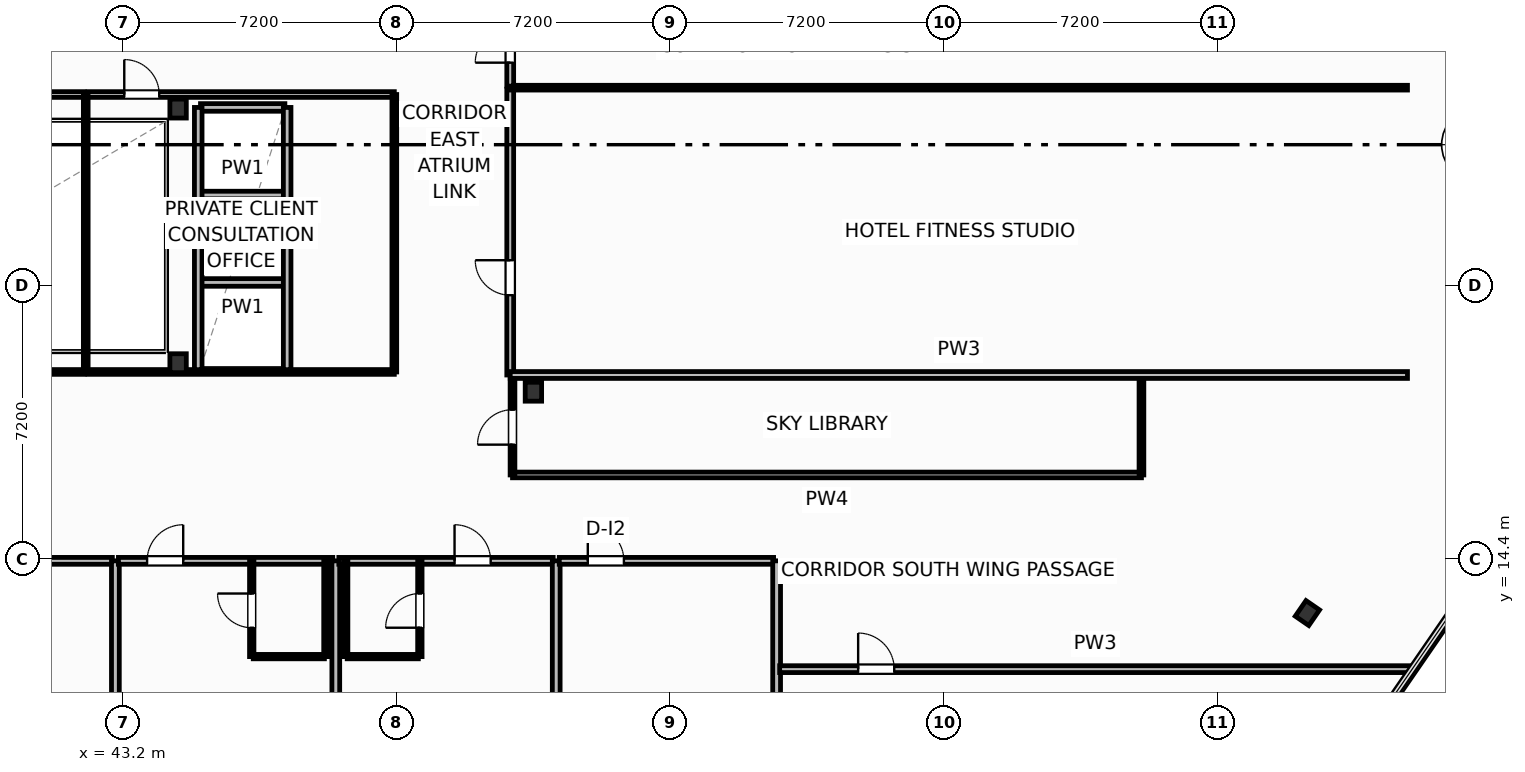
"""IFC4 building model, lengths in metres.
Left out: names, types, materials, properties, quantities, classifications, styles, units other than length and angle.
Written with IfcOpenShell. Run it as: python <this file> out.ifc"""

import sys

from ifc_helpers import new_model, si_unit, direction, frame, frame_2d, origin, origin_2d, place, context, subcontext, project, spatial, rectangle, i_section, extrude, element, fill, save


model = new_model("IFC4")
c1 = context("Model", 3, precision=1e-05, world=origin(), true_north=direction((0.0, 1.0)))
c2 = subcontext(c1, "Body", "Model", "MODEL_VIEW")
j1 = project(units=[si_unit("LENGTHUNIT", "METRE"), si_unit("PLANEANGLEUNIT", "RADIAN")], contexts=[c1])
p1 = place(None, origin())
s1 = spatial("IfcSite", under=j1, at=p1, CompositionType="ELEMENT")
p2 = place(p1, origin())
s2 = spatial("IfcBuilding", under=s1, at=p2, CompositionType="ELEMENT")
p3 = place(p2, frame((0.0, 0.0, 67.7)))
s3 = spatial("IfcBuildingStorey", under=s2, at=p3, CompositionType="ELEMENT", Elevation=67.7)
for number, where, z_axis, x_axis in (
    (1, (44.65, 19.55, 0.0), (0.0, 0.0, 1.0), (1.0, 0.0, 0.0)),
    (2, (44.65, 26.25, 0.0), (0.0, 0.0, 1.0), (1.0, 0.0, 0.0)),
    (3, (54.0, 18.8, 0.0), (0.0, 0.0, 1.0), (1.0, 0.0, 0.0)),
    (4, (74.367, 12.976, 0.0), (0.0, 0.0, 1.0), (0.824, -0.567, 0.0)),
):
    element("IfcColumn", number, at=place(p3, frame(where, z_axis=z_axis, x_axis=x_axis)), inside=s3, PredefinedType="COLUMN", context=c2, shape_type="SweptSolid", body=[
        extrude(i_section(OverallWidth=0.432, OverallDepth=0.498, WebThickness=0.056, FlangeThickness=0.089, FilletRadius=0.025, at=origin_2d()), origin(), (0.0, 0.0, 1.0), 3.7),
    ])
p4 = place(p3, frame((81.127, 26.995, 0.0), z_axis=(0.0, 0.0, 1.0), x_axis=(-0.823530169317, 0.567272474411, 0.0)))
e5 = element("IfcWall", 5, at=p4, inside=s3, PredefinedType="SOLIDWALL", context=c2, shape_type="SweptSolid", body=[
    extrude(rectangle(XDim=23.247, YDim=0.22, at=frame_2d((11.624, 0.0))), origin(), (0.0, 0.0, 1.0), 2.66),
])
p5 = place(p4, frame((10.799, 0.0, 0.8)))
e6 = element("IfcOpeningElement", 6, at=p5, cuts=e5, PredefinedType="OPENING", context=c2, shape_type="SweptSolid", body=[
    extrude(rectangle(XDim=1.65, YDim=1.65, at=frame_2d((0.825, 0.825))), frame((0.0, 0.12, 0.0), z_axis=(0.0, -1.0, 0.0), x_axis=(1.0, 0.0, 0.0)), (0.0, 0.0, 1.0), 0.24),
])
p6 = place(p3, frame((33.68, 26.62, 0.0), z_axis=(0.0, 0.0, 1.0), x_axis=(1.0, 0.0, 0.0)))
e7 = element("IfcWall", 7, at=p6, inside=s3, PredefinedType="PARTITIONING", context=c2, shape_type="SweptSolid", body=[
    extrude(rectangle(XDim=8.5, YDim=0.15, at=frame_2d((4.25, 0.0))), origin(), (0.0, 0.0, 1.0), 3.38),
])
p7 = place(p6, frame((1.85, 0.0, 0.0)))
e8 = element("IfcOpeningElement", 8, at=p7, cuts=e7, PredefinedType="OPENING", context=c2, shape_type="SweptSolid", body=[
    extrude(rectangle(XDim=0.92, YDim=2.05, at=frame_2d((0.46, 1.025))), frame((0.0, 0.085, 0.0), z_axis=(0.0, -1.0, 0.0), x_axis=(1.0, 0.0, 0.0)), (0.0, 0.0, 1.0), 0.17),
])
p8 = place(p3, frame((33.68, 19.32, 0.0), z_axis=(0.0, 0.0, 1.0), x_axis=(1.0, 0.0, 0.0)))
e9 = element("IfcWall", 9, at=p8, inside=s3, PredefinedType="PARTITIONING", context=c2, shape_type="SweptSolid", body=[
    extrude(rectangle(XDim=8.5, YDim=0.125, at=frame_2d((4.25, 0.0))), origin(), (0.0, 0.0, 1.0), 2.754),
])
p9 = place(p3, frame((42.22, 19.32, 0.0), z_axis=(0.0, 0.0, 1.0), x_axis=(0.0, 1.0, 0.0)))
e10 = element("IfcWall", 10, at=p9, inside=s3, PredefinedType="PARTITIONING", context=c2, shape_type="SweptSolid", body=[
    extrude(rectangle(XDim=7.3, YDim=0.125, at=frame_2d((3.65, 0.0))), origin(), (0.0, 0.0, 1.0), 3.38),
])
p10 = place(p3, frame((42.28, 26.62, 0.0), z_axis=(0.0, 0.0, 1.0), x_axis=(1.0, 0.0, 0.0)))
e11 = element("IfcWall", 11, at=p10, inside=s3, PredefinedType="PARTITIONING", context=c2, shape_type="SweptSolid", body=[
    extrude(rectangle(XDim=8.06, YDim=0.15, at=frame_2d((4.03, 0.0))), origin(), (0.0, 0.0, 1.0), 3.38),
])
p11 = place(p10, frame((0.954, 0.0, 0.0)))
e12 = element("IfcOpeningElement", 12, at=p11, cuts=e11, PredefinedType="OPENING", context=c2, shape_type="SweptSolid", body=[
    extrude(rectangle(XDim=0.92, YDim=2.05, at=frame_2d((0.46, 1.025))), frame((0.0, 0.085, 0.0), z_axis=(0.0, -1.0, 0.0), x_axis=(1.0, 0.0, 0.0)), (0.0, 0.0, 1.0), 0.17),
])
p12 = place(p3, frame((42.28, 19.32, 0.0), z_axis=(0.0, 0.0, 1.0), x_axis=(1.0, 0.0, 0.0)))
e13 = element("IfcWall", 13, at=p12, inside=s3, PredefinedType="PARTITIONING", context=c2, shape_type="SweptSolid", body=[
    extrude(rectangle(XDim=8.06, YDim=0.125, at=frame_2d((4.03, 0.0))), origin(), (0.0, 0.0, 1.0), 2.592),
])
p13 = place(p3, frame((50.34, 19.32, 0.0), z_axis=(0.0, 0.0, 1.0), x_axis=(0.0, 1.0, 0.0)))
e14 = element("IfcWall", 14, at=p13, inside=s3, PredefinedType="PARTITIONING", context=c2, shape_type="SweptSolid", body=[
    extrude(rectangle(XDim=7.3, YDim=0.125, at=frame_2d((3.65, 0.0))), origin(), (0.0, 0.0, 1.0), 3.38),
])
p14 = place(p3, frame((53.45, 16.61, 0.0), z_axis=(0.0, 0.0, 1.0), x_axis=(1.0, 0.0, 0.0)))
e15 = element("IfcWall", 15, at=p14, inside=s3, PredefinedType="PARTITIONING", context=c2, shape_type="SweptSolid", body=[
    extrude(rectangle(XDim=16.55, YDim=0.15, at=frame_2d((8.275, 0.0))), origin(), (0.0, 0.0, 1.0), 1.165),
])
p15 = place(p3, frame((53.45, 16.61, 0.0), z_axis=(0.0, 0.0, 1.0), x_axis=(0.0, 1.0, 0.0)))
e16 = element("IfcWall", 16, at=p15, inside=s3, PredefinedType="PARTITIONING", context=c2, shape_type="SweptSolid", body=[
    extrude(rectangle(XDim=2.63, YDim=0.125, at=frame_2d((1.315, 0.0))), origin(), (0.0, 0.0, 1.0), 3.38),
])
p16 = place(p15, frame((0.797, 0.0, 0.0)))
e17 = element("IfcOpeningElement", 17, at=p16, cuts=e16, PredefinedType="OPENING", context=c2, shape_type="SweptSolid", body=[
    extrude(rectangle(XDim=0.92, YDim=2.05, at=frame_2d((0.46, 1.025))), frame((0.0, 0.073, 0.0), z_axis=(0.0, -1.0, 0.0), x_axis=(1.0, 0.0, 0.0)), (0.0, 0.0, 1.0), 0.145),
])
p17 = place(p3, frame((70.0, 16.61, 0.0), z_axis=(0.0, 0.0, 1.0), x_axis=(0.0, 1.0, 0.0)))
e18 = element("IfcWall", 18, at=p17, inside=s3, PredefinedType="PARTITIONING", context=c2, shape_type="SweptSolid", body=[
    extrude(rectangle(XDim=2.63, YDim=0.125, at=frame_2d((1.315, 0.0))), origin(), (0.0, 0.0, 1.0), 0.65),
])
p18 = place(p3, frame((37.28, 14.35, 0.0), z_axis=(0.0, 0.0, 1.0), x_axis=(1.0, 0.0, 0.0)))
e19 = element("IfcWall", 19, at=p18, inside=s3, PredefinedType="PARTITIONING", context=c2, shape_type="SweptSolid", body=[
    extrude(rectangle(XDim=5.64, YDim=0.18, at=frame_2d((2.82, 0.0))), origin(), (0.0, 0.0, 1.0), 3.38),
])
p19 = place(p18, frame((3.045, 0.0, 0.0)))
e20 = element("IfcOpeningElement", 20, at=p19, cuts=e19, PredefinedType="OPENING", context=c2, shape_type="SweptSolid", body=[
    extrude(rectangle(XDim=0.95, YDim=2.15, at=frame_2d((0.475, 1.075))), frame((0.0, 0.1, 0.0), z_axis=(0.0, -1.0, 0.0), x_axis=(1.0, 0.0, 0.0)), (0.0, 0.0, 1.0), 0.2),
])
p20 = place(p3, frame((43.0, -4.0, 0.0), z_axis=(0.0, 0.0, 1.0), x_axis=(0.0, 1.0, 0.0)))
e21 = element("IfcWall", 21, at=p20, inside=s3, PredefinedType="PARTITIONING", context=c2, shape_type="SweptSolid", body=[
    extrude(rectangle(XDim=18.35, YDim=0.205, at=frame_2d((9.175, 0.0))), origin(), (0.0, 0.0, 1.0), 1.165),
])
p21 = place(p3, frame((43.08, 14.35, 0.0), z_axis=(0.0, 0.0, 1.0), x_axis=(1.0, 0.0, 0.0)))
e22 = element("IfcWall", 22, at=p21, inside=s3, PredefinedType="PARTITIONING", context=c2, shape_type="SweptSolid", body=[
    extrude(rectangle(XDim=5.64, YDim=0.18, at=frame_2d((2.82, 0.0))), origin(), (0.0, 0.0, 1.0), 3.38),
])
p22 = place(p21, frame((0.754, 0.0, 0.0)))
e23 = element("IfcOpeningElement", 23, at=p22, cuts=e22, PredefinedType="OPENING", context=c2, shape_type="SweptSolid", body=[
    extrude(rectangle(XDim=0.95, YDim=2.15, at=frame_2d((0.475, 1.075))), frame((0.0, 0.1, 0.0), z_axis=(0.0, -1.0, 0.0), x_axis=(1.0, 0.0, 0.0)), (0.0, 0.0, 1.0), 0.2),
])
p23 = place(p3, frame((46.628, 11.83, 0.0), z_axis=(0.0, 0.0, 1.0), x_axis=(1.0, 0.0, 0.0)))
e24 = element("IfcWall", 24, at=p23, inside=s3, PredefinedType="PARTITIONING", context=c2, shape_type="SweptSolid", body=[
    extrude(rectangle(XDim=1.872, YDim=0.115, at=frame_2d((0.936, 0.0))), origin(), (0.0, 0.0, 1.0), 3.38),
])
p24 = place(p3, frame((46.588, 11.83, 0.0), z_axis=(0.0, 0.0, 1.0), x_axis=(0.0, 1.0, 0.0)))
e25 = element("IfcWall", 25, at=p24, inside=s3, PredefinedType="PARTITIONING", context=c2, shape_type="SweptSolid", body=[
    extrude(rectangle(XDim=2.52, YDim=0.115, at=frame_2d((1.26, 0.0))), origin(), (0.0, 0.0, 1.0), 3.38),
])
p25 = place(p24, frame((0.76, 0.0, 0.0)))
e26 = element("IfcOpeningElement", 26, at=p25, cuts=e25, PredefinedType="OPENING", context=c2, shape_type="SweptSolid", body=[
    extrude(rectangle(XDim=0.9, YDim=2.05, at=frame_2d((0.45, 1.025))), frame((0.0, 0.067, 0.0), z_axis=(0.0, -1.0, 0.0), x_axis=(1.0, 0.0, 0.0)), (0.0, 0.0, 1.0), 0.135),
])
p26 = place(p3, frame((48.54, 11.83, 0.0), z_axis=(0.0, 0.0, 1.0), x_axis=(0.0, 1.0, 0.0)))
e27 = element("IfcWall", 27, at=p26, inside=s3, PredefinedType="PARTITIONING", context=c2, shape_type="SweptSolid", body=[
    extrude(rectangle(XDim=2.52, YDim=0.115, at=frame_2d((1.26, 0.0))), origin(), (0.0, 0.0, 1.0), 3.38),
])
p27 = place(p3, frame((48.8, -4.0, 0.0), z_axis=(0.0, 0.0, 1.0), x_axis=(0.0, 1.0, 0.0)))
e28 = element("IfcWall", 28, at=p27, inside=s3, PredefinedType="PARTITIONING", context=c2, shape_type="SweptSolid", body=[
    extrude(rectangle(XDim=18.35, YDim=0.205, at=frame_2d((9.175, 0.0))), origin(), (0.0, 0.0, 1.0), 3.38),
])
p28 = place(p3, frame((48.88, 14.35, 0.0), z_axis=(0.0, 0.0, 1.0), x_axis=(1.0, 0.0, 0.0)))
e29 = element("IfcWall", 29, at=p28, inside=s3, PredefinedType="PARTITIONING", context=c2, shape_type="SweptSolid", body=[
    extrude(rectangle(XDim=5.64, YDim=0.18, at=frame_2d((2.82, 0.0))), origin(), (0.0, 0.0, 1.0), 3.38),
])
p29 = place(p28, frame((3.045, 0.0, 0.0)))
e30 = element("IfcOpeningElement", 30, at=p29, cuts=e29, PredefinedType="OPENING", context=c2, shape_type="SweptSolid", body=[
    extrude(rectangle(XDim=0.95, YDim=2.15, at=frame_2d((0.475, 1.075))), frame((0.0, 0.1, 0.0), z_axis=(0.0, -1.0, 0.0), x_axis=(1.0, 0.0, 0.0)), (0.0, 0.0, 1.0), 0.2),
])
p30 = place(p3, frame((49.1, 11.83, 0.0), z_axis=(0.0, 0.0, 1.0), x_axis=(1.0, 0.0, 0.0)))
e31 = element("IfcWall", 31, at=p30, inside=s3, PredefinedType="PARTITIONING", context=c2, shape_type="SweptSolid", body=[
    extrude(rectangle(XDim=1.872, YDim=0.115, at=frame_2d((0.936, 0.0))), origin(), (0.0, 0.0, 1.0), 3.38),
])
p31 = place(p3, frame((51.012, 11.83, 0.0), z_axis=(0.0, 0.0, 1.0), x_axis=(0.0, 1.0, 0.0)))
e32 = element("IfcWall", 32, at=p31, inside=s3, PredefinedType="PARTITIONING", context=c2, shape_type="SweptSolid", body=[
    extrude(rectangle(XDim=2.52, YDim=0.115, at=frame_2d((1.26, 0.0))), origin(), (0.0, 0.0, 1.0), 3.38),
])
p32 = place(p31, frame((0.76, 0.0, 0.0)))
e33 = element("IfcOpeningElement", 33, at=p32, cuts=e32, PredefinedType="OPENING", context=c2, shape_type="SweptSolid", body=[
    extrude(rectangle(XDim=0.9, YDim=2.05, at=frame_2d((0.45, 1.025))), frame((0.0, 0.067, 0.0), z_axis=(0.0, -1.0, 0.0), x_axis=(1.0, 0.0, 0.0)), (0.0, 0.0, 1.0), 0.135),
])
p33 = place(p3, frame((49.06, 11.83, 0.0), z_axis=(0.0, 0.0, 1.0), x_axis=(0.0, 1.0, 0.0)))
e34 = element("IfcWall", 34, at=p33, inside=s3, PredefinedType="PARTITIONING", context=c2, shape_type="SweptSolid", body=[
    extrude(rectangle(XDim=2.52, YDim=0.115, at=frame_2d((1.26, 0.0))), origin(), (0.0, 0.0, 1.0), 3.38),
])
p34 = place(p3, frame((54.6, -4.0, 0.0), z_axis=(0.0, 0.0, 1.0), x_axis=(0.0, 1.0, 0.0)))
e35 = element("IfcWall", 35, at=p34, inside=s3, PredefinedType="PARTITIONING", context=c2, shape_type="SweptSolid", body=[
    extrude(rectangle(XDim=18.35, YDim=0.205, at=frame_2d((9.175, 0.0))), origin(), (0.0, 0.0, 1.0), 3.38),
])
p35 = place(p3, frame((54.68, 14.35, 0.0), z_axis=(0.0, 0.0, 1.0), x_axis=(1.0, 0.0, 0.0)))
e36 = element("IfcWall", 36, at=p35, inside=s3, PredefinedType="PARTITIONING", context=c2, shape_type="SweptSolid", body=[
    extrude(rectangle(XDim=5.64, YDim=0.18, at=frame_2d((2.82, 0.0))), origin(), (0.0, 0.0, 1.0), 3.38),
])
p36 = place(p35, frame((0.751, 0.0, 0.0)))
e37 = element("IfcOpeningElement", 37, at=p36, cuts=e36, PredefinedType="OPENING", context=c2, shape_type="SweptSolid", body=[
    extrude(rectangle(XDim=0.95, YDim=2.05, at=frame_2d((0.475, 1.025))), frame((0.0, 0.1, 0.0), z_axis=(0.0, -1.0, 0.0), x_axis=(1.0, 0.0, 0.0)), (0.0, 0.0, 1.0), 0.2),
])
p37 = place(p3, frame((60.4, -4.0, 0.0), z_axis=(0.0, 0.0, 1.0), x_axis=(0.0, 1.0, 0.0)))
e38 = element("IfcWall", 38, at=p37, inside=s3, PredefinedType="PARTITIONING", context=c2, shape_type="SweptSolid", body=[
    extrude(rectangle(XDim=18.35, YDim=0.205, at=frame_2d((9.175, 0.0))), origin(), (0.0, 0.0, 1.0), 3.38),
])
p38 = place(p3, frame((60.48, 11.5, 0.0), z_axis=(0.0, 0.0, 1.0), x_axis=(1.0, 0.0, 0.0)))
e39 = element("IfcWall", 39, at=p38, inside=s3, PredefinedType="PARTITIONING", context=c2, shape_type="SweptSolid", body=[
    extrude(rectangle(XDim=16.604, YDim=0.18, at=frame_2d((8.302, 0.0))), origin(), (0.0, 0.0, 1.0), 3.38),
])
p39 = place(p38, frame((2.065, 0.0, 0.0)))
e40 = element("IfcOpeningElement", 40, at=p39, cuts=e39, PredefinedType="OPENING", context=c2, shape_type="SweptSolid", body=[
    extrude(rectangle(XDim=0.95, YDim=2.05, at=frame_2d((0.475, 1.025))), frame((0.0, 0.1, 0.0), z_axis=(0.0, -1.0, 0.0), x_axis=(1.0, 0.0, 0.0)), (0.0, 0.0, 1.0), 0.2),
])
p40 = place(p3, frame((53.39, 19.24, 0.0), z_axis=(0.0, 0.0, 1.0), x_axis=(0.0, 1.0, 0.0)))
e41 = element("IfcWall", 41, at=p40, inside=s3, PredefinedType="PARTITIONING", context=c2, shape_type="SweptSolid", body=[
    extrude(rectangle(XDim=7.52, YDim=0.18, at=frame_2d((3.76, 0.0))), origin(), (0.0, 0.0, 1.0), 3.38),
])
p41 = place(p40, frame((2.1, 0.0, 0.0)))
e42 = element("IfcOpeningElement", 42, at=p41, cuts=e41, PredefinedType="OPENING", context=c2, shape_type="SweptSolid", body=[
    extrude(rectangle(XDim=0.92, YDim=2.05, at=frame_2d((0.46, 1.025))), frame((0.0, 0.1, 0.0), z_axis=(0.0, -1.0, 0.0), x_axis=(1.0, 0.0, 0.0)), (0.0, 0.0, 1.0), 0.2),
])
p42 = place(p3, frame((53.39, 26.8, 0.0), z_axis=(0.0, 0.0, 1.0), x_axis=(1.0, 0.0, 0.0)))
e43 = element("IfcWall", 43, at=p42, inside=s3, PredefinedType="PARTITIONING", context=c2, shape_type="SweptSolid", body=[
    extrude(rectangle(XDim=23.61, YDim=0.125, at=frame_2d((11.805, 0.0))), origin(), (0.0, 0.0, 1.0), 3.38),
])
p43 = place(p3, frame((53.39, 19.24, 0.0), z_axis=(0.0, 0.0, 1.0), x_axis=(1.0, 0.0, 0.0)))
e44 = element("IfcWall", 44, at=p43, inside=s3, PredefinedType="PARTITIONING", context=c2, shape_type="SweptSolid", body=[
    extrude(rectangle(XDim=23.61, YDim=0.18, at=frame_2d((11.805, 0.0))), origin(), (0.0, 0.0, 1.0), 3.38),
])
p44 = place(p3, frame((53.39, 26.84, 0.0), z_axis=(0.0, 0.0, 1.0), x_axis=(0.0, 1.0, 0.0)))
e45 = element("IfcWall", 45, at=p44, inside=s3, PredefinedType="PARTITIONING", context=c2, shape_type="SweptSolid", body=[
    extrude(rectangle(XDim=12.46, YDim=0.18, at=frame_2d((6.23, 0.0))), origin(), (0.0, 0.0, 1.0), 3.38),
])
p45 = place(p44, frame((0.618, 0.0, 0.0)))
e46 = element("IfcOpeningElement", 46, at=p45, cuts=e45, PredefinedType="OPENING", context=c2, shape_type="SweptSolid", body=[
    extrude(rectangle(XDim=0.92, YDim=2.05, at=frame_2d((0.46, 1.025))), frame((0.0, 0.1, 0.0), z_axis=(0.0, -1.0, 0.0), x_axis=(1.0, 0.0, 0.0)), (0.0, 0.0, 1.0), 0.2),
])
for number, where, z_axis, x_axis in (
    (47, (45.24, 21.675, 0.0), (0.0, 0.0, 1.0), (1.0, 0.0, 0.0)),
    (48, (45.24, 23.975, 0.0), (0.0, 0.0, 1.0), (1.0, 0.0, 0.0)),
    (49, (45.24, 26.28, 0.0), (0.0, 0.0, 1.0), (1.0, 0.0, 0.0)),
):
    element("IfcWall", number, at=place(p3, frame(where, z_axis=z_axis, x_axis=x_axis)), inside=s3, PredefinedType="PARTITIONING", context=c2, shape_type="SweptSolid", body=[
        extrude(rectangle(XDim=2.22, YDim=0.2, at=frame_2d((1.11, 0.0))), origin(), (0.0, 0.0, 1.0), 3.38),
    ])
for number, where, z_axis, x_axis in (
    (50, (45.18, 19.38, 0.0), (0.0, 0.0, 1.0), (0.0, 1.0, 0.0)),
    (51, (47.52, 19.38, 0.0), (0.0, 0.0, 1.0), (0.0, 1.0, 0.0)),
):
    element("IfcWall", number, at=place(p3, frame(where, z_axis=z_axis, x_axis=x_axis)), inside=s3, PredefinedType="PARTITIONING", context=c2, shape_type="SweptSolid", body=[
        extrude(rectangle(XDim=6.9, YDim=0.2, at=frame_2d((3.45, 0.0))), origin(), (0.0, 0.0, 1.0), 3.38),
    ])
p46 = place(p11, origin())
e52 = element("IfcDoor", 52, at=p46, inside=s3, OperationType="SINGLE_SWING_LEFT", PredefinedType="DOOR", context=c2, shape_type="SweptSolid", body=[
    extrude(rectangle(XDim=0.92, YDim=2.05, at=frame_2d((0.46, 1.025))), frame((0.0, 0.025, 0.0), z_axis=(0.0, -1.0, 0.0), x_axis=(1.0, 0.0, 0.0)), (0.0, 0.0, 1.0), 0.05),
])
fill(e12, e52)
p47 = place(p16, origin())
e53 = element("IfcDoor", 53, at=p47, inside=s3, OperationType="SINGLE_SWING_LEFT", PredefinedType="DOOR", context=c2, shape_type="SweptSolid", body=[
    extrude(rectangle(XDim=0.92, YDim=2.05, at=frame_2d((0.46, 1.025))), frame((0.0, 0.025, 0.0), z_axis=(0.0, -1.0, 0.0), x_axis=(1.0, 0.0, 0.0)), (0.0, 0.0, 1.0), 0.05),
])
fill(e17, e53)
p48 = place(p22, origin())
e54 = element("IfcDoor", 54, at=p48, inside=s3, OperationType="SINGLE_SWING_RIGHT", PredefinedType="DOOR", context=c2, shape_type="SweptSolid", body=[
    extrude(rectangle(XDim=0.95, YDim=2.15, at=frame_2d((0.475, 1.075))), frame((0.0, 0.025, 0.0), z_axis=(0.0, -1.0, 0.0), x_axis=(1.0, 0.0, 0.0)), (0.0, 0.0, 1.0), 0.05),
])
fill(e23, e54)
p49 = place(p25, origin())
e55 = element("IfcDoor", 55, at=p49, inside=s3, OperationType="SINGLE_SWING_RIGHT", PredefinedType="DOOR", context=c2, shape_type="SweptSolid", body=[
    extrude(rectangle(XDim=0.9, YDim=2.05, at=frame_2d((0.45, 1.025))), frame((0.0, 0.025, 0.0), z_axis=(0.0, -1.0, 0.0), x_axis=(1.0, 0.0, 0.0)), (0.0, 0.0, 1.0), 0.05),
])
fill(e26, e55)
p50 = place(p29, origin())
e56 = element("IfcDoor", 56, at=p50, inside=s3, OperationType="SINGLE_SWING_LEFT", PredefinedType="DOOR", context=c2, shape_type="SweptSolid", body=[
    extrude(rectangle(XDim=0.95, YDim=2.15, at=frame_2d((0.475, 1.075))), frame((0.0, 0.025, 0.0), z_axis=(0.0, -1.0, 0.0), x_axis=(1.0, 0.0, 0.0)), (0.0, 0.0, 1.0), 0.05),
])
fill(e30, e56)
p51 = place(p32, origin())
e57 = element("IfcDoor", 57, at=p51, inside=s3, OperationType="SINGLE_SWING_LEFT", PredefinedType="DOOR", context=c2, shape_type="SweptSolid", body=[
    extrude(rectangle(XDim=0.9, YDim=2.05, at=frame_2d((0.45, 1.025))), frame((0.0, 0.025, 0.0), z_axis=(0.0, -1.0, 0.0), x_axis=(1.0, 0.0, 0.0)), (0.0, 0.0, 1.0), 0.05),
])
fill(e33, e57)
p52 = place(p36, origin())
e58 = element("IfcDoor", 58, at=p52, inside=s3, OperationType="SINGLE_SWING_LEFT", PredefinedType="DOOR", context=c2, shape_type="SweptSolid", body=[
    extrude(rectangle(XDim=0.95, YDim=2.05, at=frame_2d((0.475, 1.025))), frame((0.0, 0.025, 0.0), z_axis=(0.0, -1.0, 0.0), x_axis=(1.0, 0.0, 0.0)), (0.0, 0.0, 1.0), 0.05),
])
fill(e37, e58)
p53 = place(p39, origin())
e59 = element("IfcDoor", 59, at=p53, inside=s3, OperationType="SINGLE_SWING_LEFT", PredefinedType="DOOR", context=c2, shape_type="SweptSolid", body=[
    extrude(rectangle(XDim=0.95, YDim=2.05, at=frame_2d((0.475, 1.025))), frame((0.0, 0.025, 0.0), z_axis=(0.0, -1.0, 0.0), x_axis=(1.0, 0.0, 0.0)), (0.0, 0.0, 1.0), 0.05),
])
fill(e40, e59)
p54 = place(p41, origin())
e60 = element("IfcDoor", 60, at=p54, inside=s3, OperationType="SINGLE_SWING_RIGHT", PredefinedType="DOOR", context=c2, shape_type="SweptSolid", body=[
    extrude(rectangle(XDim=0.92, YDim=2.05, at=frame_2d((0.46, 1.025))), frame((0.0, 0.025, 0.0), z_axis=(0.0, -1.0, 0.0), x_axis=(1.0, 0.0, 0.0)), (0.0, 0.0, 1.0), 0.05),
])
fill(e42, e60)
p55 = place(p45, origin())
e61 = element("IfcDoor", 61, at=p55, inside=s3, OperationType="SINGLE_SWING_LEFT", PredefinedType="DOOR", context=c2, shape_type="SweptSolid", body=[
    extrude(rectangle(XDim=0.92, YDim=2.05, at=frame_2d((0.46, 1.025))), frame((0.0, 0.025, 0.0), z_axis=(0.0, -1.0, 0.0), x_axis=(1.0, 0.0, 0.0)), (0.0, 0.0, 1.0), 0.05),
])
fill(e46, e61)
save(model, sys.argv[1])
